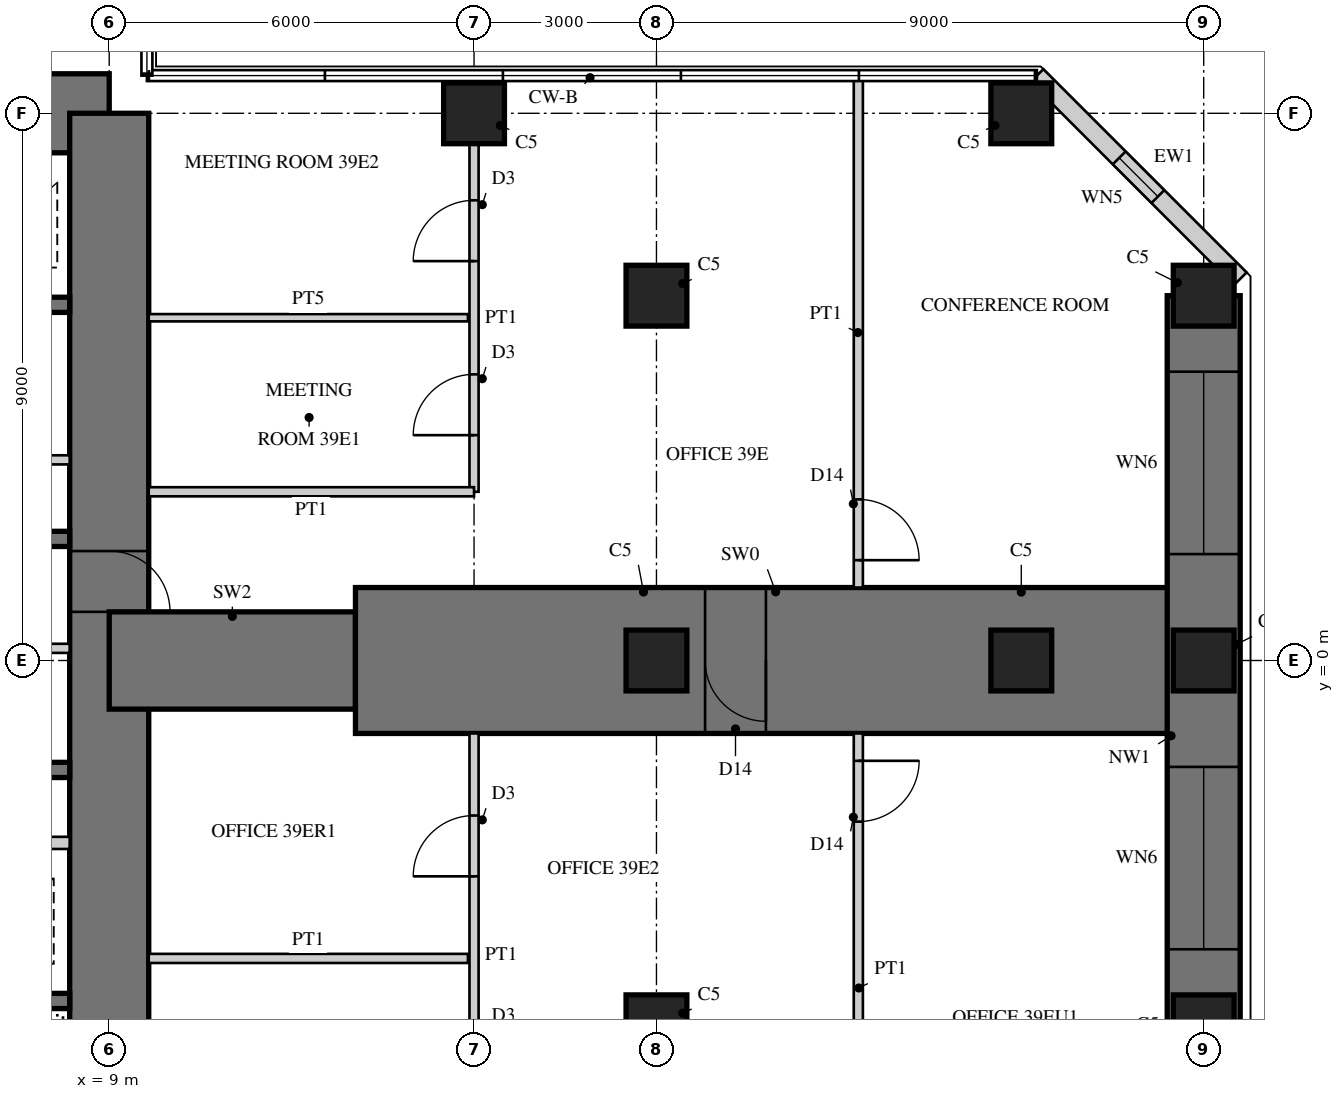
"""IFC4 building model, lengths in metres.
Left out: names, types, materials, properties, quantities, classifications, styles, units other than length and angle.
Written with IfcOpenShell. Run it as: python <this file> out.ifc"""

import sys

from ifc_helpers import new_model, si_unit, direction, frame, frame_2d, origin, origin_2d, place, context, subcontext, project, spatial, rectangle, hollow_rectangle, extrude, element, fill, save


model = new_model("IFC4")
c1 = context("Model", 3, precision=1e-05, world=origin(), true_north=direction((0.0, 1.0)))
c2 = subcontext(c1, "Body", "Model", "MODEL_VIEW")
j1 = project(units=[si_unit("LENGTHUNIT", "METRE"), si_unit("PLANEANGLEUNIT", "RADIAN")], contexts=[c1])
p1 = place(None, origin())
s1 = spatial("IfcSite", under=j1, at=p1, CompositionType="ELEMENT")
p2 = place(p1, origin())
s2 = spatial("IfcBuilding", under=s1, at=p2, CompositionType="ELEMENT")
p3 = place(p2, frame((0.0, 0.0, 160.5)))
s3 = spatial("IfcBuildingStorey", under=s2, at=p3, CompositionType="ELEMENT", Elevation=160.5)
p4 = place(p3, frame((9.0, 9.0, 0.0), z_axis=(0.0, 0.0, 1.0), x_axis=(-1.0, 0.0, 0.0)))
e1 = element("IfcWall", 1, at=p4, inside=s3, PredefinedType="SHEAR", context=c2, shape_type="SweptSolid", body=[
    extrude(rectangle(XDim=18.0, YDim=1.3, at=frame_2d((9.0, 0.0))), origin(), (0.0, 0.0, 1.0), 4.0),
])
p5 = place(p4, frame((9.8, 0.0, 0.0)))
e2 = element("IfcOpeningElement", 2, at=p5, cuts=e1, PredefinedType="OPENING", context=c2, shape_type="SweptSolid", body=[
    extrude(rectangle(XDim=1.0, YDim=2.4, at=frame_2d((0.5, 1.2))), frame((0.0, 0.66, 0.0), z_axis=(0.0, -1.0, 0.0), x_axis=(1.0, 0.0, 0.0)), (0.0, 0.0, 1.0), 1.32),
])
p6 = place(p3, frame((9.0, -9.0, 0.0), z_axis=(0.0, 0.0, 1.0), x_axis=(0.0, 1.0, 0.0)))
e3 = element("IfcWall", 3, at=p6, inside=s3, PredefinedType="SHEAR", context=c2, shape_type="SweptSolid", body=[
    extrude(rectangle(XDim=18.0, YDim=1.3, at=frame_2d((9.0, 0.0))), origin(), (0.0, 0.0, 1.0), 4.0),
])
p7 = place(p6, frame((9.8, 0.0, 0.0)))
e4 = element("IfcOpeningElement", 4, at=p7, cuts=e3, PredefinedType="OPENING", context=c2, shape_type="SweptSolid", body=[
    extrude(rectangle(XDim=1.0, YDim=2.4, at=frame_2d((0.5, 1.2))), frame((0.0, 0.66, 0.0), z_axis=(0.0, -1.0, 0.0), x_axis=(1.0, 0.0, 0.0)), (0.0, 0.0, 1.0), 1.32),
])
p8 = place(p3, frame((1.925, 2.0, 0.0), z_axis=(0.0, 0.0, 1.0), x_axis=(1.0, 0.0, 0.0)))
e5 = element("IfcWall", 5, at=p8, inside=s3, PredefinedType="SHEAR", context=c2, shape_type="SweptSolid", body=[
    extrude(rectangle(XDim=6.425, YDim=0.25, at=frame_2d((3.212, 0.0))), origin(), (0.0, 0.0, 1.0), 4.0),
])
p9 = place(p3, frame((1.925, 5.85, 0.0), z_axis=(0.0, 0.0, 1.0), x_axis=(1.0, 0.0, 0.0)))
e6 = element("IfcWall", 6, at=p9, inside=s3, PredefinedType="SHEAR", context=c2, shape_type="SweptSolid", body=[
    extrude(rectangle(XDim=6.425, YDim=0.25, at=frame_2d((3.212, 0.0))), origin(), (0.0, 0.0, 1.0), 4.0),
])
p10 = place(p9, frame((0.454, 0.0, 0.0)))
e7 = element("IfcOpeningElement", 7, at=p10, cuts=e6, PredefinedType="OPENING", context=c2, shape_type="SweptSolid", body=[
    extrude(rectangle(XDim=1.1, YDim=2.2, at=frame_2d((0.55, 1.1))), frame((0.0, 0.135, 0.0), z_axis=(0.0, -1.0, 0.0), x_axis=(1.0, 0.0, 0.0)), (0.0, 0.0, 1.0), 0.27),
])
p11 = place(p9, frame((2.663, 0.0, 0.0)))
e8 = element("IfcOpeningElement", 8, at=p11, cuts=e6, PredefinedType="OPENING", context=c2, shape_type="SweptSolid", body=[
    extrude(rectangle(XDim=1.1, YDim=2.2, at=frame_2d((0.55, 1.1))), frame((0.0, 0.135, 0.0), z_axis=(0.0, -1.0, 0.0), x_axis=(1.0, 0.0, 0.0)), (0.0, 0.0, 1.0), 0.27),
])
p12 = place(p9, frame((4.871, 0.0, 0.0)))
e9 = element("IfcOpeningElement", 9, at=p12, cuts=e6, PredefinedType="OPENING", context=c2, shape_type="SweptSolid", body=[
    extrude(rectangle(XDim=1.1, YDim=2.2, at=frame_2d((0.55, 1.1))), frame((0.0, 0.135, 0.0), z_axis=(0.0, -1.0, 0.0), x_axis=(1.0, 0.0, 0.0)), (0.0, 0.0, 1.0), 0.27),
])
p13 = place(p3, frame((1.925, 3.3, 0.0), z_axis=(0.0, 0.0, 1.0), x_axis=(1.0, 0.0, 0.0)))
e10 = element("IfcWall", 10, at=p13, inside=s3, PredefinedType="PARTITIONING", context=c2, shape_type="SweptSolid", body=[
    extrude(rectangle(XDim=6.425, YDim=0.15, at=frame_2d((3.212, 0.0))), origin(), (0.0, 0.0, 1.0), 4.0),
])
p14 = place(p13, frame((0.075, 0.0, 0.0)))
e11 = element("IfcOpeningElement", 11, at=p14, cuts=e10, PredefinedType="OPENING", context=c2, shape_type="SweptSolid", body=[
    extrude(rectangle(XDim=0.8, YDim=2.1, at=frame_2d((0.4, 1.05))), frame((0.0, 0.085, 0.0), z_axis=(0.0, -1.0, 0.0), x_axis=(1.0, 0.0, 0.0)), (0.0, 0.0, 1.0), 0.17),
])
p15 = place(p13, frame((3.675, 0.0, 0.0)))
e12 = element("IfcOpeningElement", 12, at=p15, cuts=e10, PredefinedType="OPENING", context=c2, shape_type="SweptSolid", body=[
    extrude(rectangle(XDim=0.8, YDim=2.1, at=frame_2d((0.4, 1.05))), frame((0.0, 0.085, 0.0), z_axis=(0.0, -1.0, 0.0), x_axis=(1.0, 0.0, 0.0)), (0.0, 0.0, 1.0), 0.17),
])
p16 = place(p3, frame((2.125, -1.8, 0.0), z_axis=(0.0, 0.0, 1.0), x_axis=(1.0, 0.0, 0.0)))
e13 = element("IfcWall", 13, at=p16, inside=s3, PredefinedType="SHEAR", context=c2, shape_type="SweptSolid", body=[
    extrude(rectangle(XDim=6.225, YDim=0.25, at=frame_2d((3.113, 0.0))), origin(), (0.0, 0.0, 1.0), 4.0),
])
p17 = place(p3, frame((2.125, -5.6, 0.0), z_axis=(0.0, 0.0, 1.0), x_axis=(1.0, 0.0, 0.0)))
e14 = element("IfcWall", 14, at=p17, inside=s3, PredefinedType="SHEAR", context=c2, shape_type="SweptSolid", body=[
    extrude(rectangle(XDim=6.225, YDim=0.25, at=frame_2d((3.113, 0.0))), origin(), (0.0, 0.0, 1.0), 4.0),
])
p18 = place(p17, frame((0.175, 0.0, 0.0)))
e15 = element("IfcOpeningElement", 15, at=p18, cuts=e14, PredefinedType="OPENING", context=c2, shape_type="SweptSolid", body=[
    extrude(rectangle(XDim=1.0, YDim=2.1, at=frame_2d((0.5, 1.05))), frame((0.0, 0.135, 0.0), z_axis=(0.0, -1.0, 0.0), x_axis=(1.0, 0.0, 0.0)), (0.0, 0.0, 1.0), 0.27),
])
p19 = place(p3, frame((5.725, -3.0, 0.0), z_axis=(0.0, 0.0, 1.0), x_axis=(1.0, 0.0, 0.0)))
e16 = element("IfcWall", 16, at=p19, inside=s3, PredefinedType="PARTITIONING", context=c2, shape_type="SweptSolid", body=[
    extrude(rectangle(XDim=2.625, YDim=0.2, at=frame_2d((1.312, 0.0))), origin(), (0.0, 0.0, 1.0), 4.0),
])
p20 = place(p3, frame((9.0, 0.0, 0.0), z_axis=(0.0, 0.0, 1.0), x_axis=(1.0, 0.0, 0.0)))
e17 = element("IfcWall", 17, at=p20, inside=s3, PredefinedType="SHEAR", context=c2, shape_type="SweptSolid", body=[
    extrude(rectangle(XDim=4.05, YDim=1.6, at=frame_2d((2.025, 0.0))), origin(), (0.0, 0.0, 1.0), 4.0),
])
p21 = place(p3, frame((13.05, 0.0, 0.0), z_axis=(0.0, 0.0, 1.0), x_axis=(1.0, 0.0, 0.0)))
e18 = element("IfcWall", 18, at=p21, inside=s3, PredefinedType="SHEAR", context=c2, shape_type="SweptSolid", body=[
    extrude(rectangle(XDim=13.95, YDim=2.4, at=frame_2d((6.975, 0.0))), origin(), (0.0, 0.0, 1.0), 4.0),
])
p22 = place(p21, frame((5.75, 0.0, 0.0)))
e19 = element("IfcOpeningElement", 19, at=p22, cuts=e18, PredefinedType="OPENING", context=c2, shape_type="SweptSolid", body=[
    extrude(rectangle(XDim=1.0, YDim=2.2, at=frame_2d((0.5, 1.1))), frame((0.0, 1.21, 0.0), z_axis=(0.0, -1.0, 0.0), x_axis=(1.0, 0.0, 0.0)), (0.0, 0.0, 1.0), 2.42),
])
p23 = place(p3, frame((27.0, -6.0, 0.0), z_axis=(0.0, 0.0, 1.0), x_axis=(0.0, 1.0, 0.0)))
e20 = element("IfcWall", 20, at=p23, inside=s3, PredefinedType="SHEAR", context=c2, shape_type="SweptSolid", body=[
    extrude(rectangle(XDim=12.0, YDim=1.2, at=frame_2d((6.0, 0.0))), origin(), (0.0, 0.0, 1.0), 4.0),
])
p24 = place(p23, frame((1.25, 0.0, 0.6)))
e21 = element("IfcOpeningElement", 21, at=p24, cuts=e20, PredefinedType="OPENING", context=c2, shape_type="SweptSolid", body=[
    extrude(rectangle(XDim=3.0, YDim=2.4, at=frame_2d((1.5, 1.2))), frame((0.0, 0.61, 0.0), z_axis=(0.0, -1.0, 0.0), x_axis=(1.0, 0.0, 0.0)), (0.0, 0.0, 1.0), 1.22),
])
p25 = place(p23, frame((7.75, 0.0, 0.6)))
e22 = element("IfcOpeningElement", 22, at=p25, cuts=e20, PredefinedType="OPENING", context=c2, shape_type="SweptSolid", body=[
    extrude(rectangle(XDim=3.0, YDim=2.4, at=frame_2d((1.5, 1.2))), frame((0.0, 0.61, 0.0), z_axis=(0.0, -1.0, 0.0), x_axis=(1.0, 0.0, 0.0)), (0.0, 0.0, 1.0), 1.22),
])
for number, where, z_axis, x_axis in (
    (23, (15.0, 9.0, 0.0), (0.0, 0.0, 1.0), (1.0, 0.0, 0.0)),
    (24, (24.0, 9.0, 0.0), (0.0, 0.0, 1.0), (1.0, 0.0, 0.0)),
    (25, (27.0, -6.0, 0.0), (0.0, 0.0, 1.0), (1.0, 0.0, 0.0)),
    (26, (27.0, 0.0, 0.0), (0.0, 0.0, 1.0), (1.0, 0.0, 0.0)),
    (27, (27.0, 6.0, 0.0), (0.0, 0.0, 1.0), (1.0, 0.0, 0.0)),
    (28, (18.0, -6.0, 0.0), (0.0, 0.0, 1.0), (1.0, 0.0, 0.0)),
    (29, (18.0, 0.0, 0.0), (0.0, 0.0, 1.0), (1.0, 0.0, 0.0)),
    (30, (18.0, 6.0, 0.0), (0.0, 0.0, 1.0), (1.0, 0.0, 0.0)),
    (31, (24.0, 0.0, 0.0), (0.0, 0.0, 1.0), (1.0, 0.0, 0.0)),
):
    element("IfcColumn", number, at=place(p3, frame(where, z_axis=z_axis, x_axis=x_axis)), inside=s3, PredefinedType="COLUMN", context=c2, shape_type="SweptSolid", body=[
        extrude(rectangle(XDim=1.0, YDim=1.0, at=origin_2d()), origin(), (0.0, 0.0, 1.0), 4.0),
    ])
p26 = place(p3, frame((27.6, 6.277, 0.0), z_axis=(0.0, 0.0, 1.0), x_axis=(-0.707106781187, 0.707106781187, 0.0)))
e32 = element("IfcWall", 32, at=p26, inside=s3, PredefinedType="SOLIDWALL", context=c2, shape_type="SweptSolid", body=[
    extrude(rectangle(XDim=4.728, YDim=0.3, at=frame_2d((2.364, 0.0))), origin(), (0.0, 0.0, 1.0), 3.75),
])
p27 = place(p26, frame((1.914, 0.0, 0.3)))
e33 = element("IfcOpeningElement", 33, at=p27, cuts=e32, PredefinedType="OPENING", context=c2, shape_type="SweptSolid", body=[
    extrude(rectangle(XDim=0.9, YDim=2.4, at=frame_2d((0.45, 1.2))), frame((0.0, 0.16, 0.0), z_axis=(0.0, -1.0, 0.0), x_axis=(1.0, 0.0, 0.0)), (0.0, 0.0, 1.0), 0.32),
])
p28 = place(p3, frame((2.325, 0.2, 0.0), z_axis=(0.0, 0.0, 1.0), x_axis=(1.0, 0.0, 0.0)))
e34 = element("IfcWall", 34, at=p28, inside=s3, PredefinedType="PARTITIONING", context=c2, shape_type="SweptSolid", body=[
    extrude(rectangle(XDim=6.025, YDim=0.15, at=frame_2d((3.013, 0.0))), origin(), (0.0, 0.0, 1.0), 3.75),
])
p29 = place(p28, frame((0.4, 0.0, 0.0)))
e35 = element("IfcOpeningElement", 35, at=p29, cuts=e34, PredefinedType="OPENING", context=c2, shape_type="SweptSolid", body=[
    extrude(rectangle(XDim=1.0, YDim=2.1, at=frame_2d((0.5, 1.05))), frame((0.0, 0.085, 0.0), z_axis=(0.0, -1.0, 0.0), x_axis=(1.0, 0.0, 0.0)), (0.0, 0.0, 1.0), 0.17),
])
p30 = place(p3, frame((15.0, 2.775, 0.0), z_axis=(0.0, 0.0, 1.0), x_axis=(0.0, 1.0, 0.0)))
e36 = element("IfcWall", 36, at=p30, inside=s3, PredefinedType="PARTITIONING", context=c2, shape_type="SweptSolid", body=[
    extrude(rectangle(XDim=5.725, YDim=0.15, at=frame_2d((2.863, 0.0))), origin(), (0.0, 0.0, 1.0), 2.7),
])
p31 = place(p30, frame((0.931, 0.0, 0.0)))
e37 = element("IfcOpeningElement", 37, at=p31, cuts=e36, PredefinedType="OPENING", context=c2, shape_type="SweptSolid", body=[
    extrude(rectangle(XDim=1.0, YDim=2.1, at=frame_2d((0.5, 1.05))), frame((0.0, 0.085, 0.0), z_axis=(0.0, -1.0, 0.0), x_axis=(1.0, 0.0, 0.0)), (0.0, 0.0, 1.0), 0.17),
])
p32 = place(p30, frame((3.794, 0.0, 0.0)))
e38 = element("IfcOpeningElement", 38, at=p32, cuts=e36, PredefinedType="OPENING", context=c2, shape_type="SweptSolid", body=[
    extrude(rectangle(XDim=1.0, YDim=2.1, at=frame_2d((0.5, 1.05))), frame((0.0, 0.085, 0.0), z_axis=(0.0, -1.0, 0.0), x_axis=(1.0, 0.0, 0.0)), (0.0, 0.0, 1.0), 0.17),
])
p33 = place(p3, frame((9.65, 2.775, 0.0), z_axis=(0.0, 0.0, 1.0), x_axis=(1.0, 0.0, 0.0)))
e39 = element("IfcWall", 39, at=p33, inside=s3, PredefinedType="PARTITIONING", context=c2, shape_type="SweptSolid", body=[
    extrude(rectangle(XDim=5.35, YDim=0.15, at=frame_2d((2.675, 0.0))), origin(), (0.0, 0.0, 1.0), 3.75),
])
p34 = place(p3, frame((9.65, 5.637, 0.0), z_axis=(0.0, 0.0, 1.0), x_axis=(1.0, 0.0, 0.0)))
e40 = element("IfcWall", 40, at=p34, inside=s3, PredefinedType="PLUMBINGWALL", context=c2, shape_type="SweptSolid", body=[
    extrude(rectangle(XDim=5.25, YDim=0.12, at=frame_2d((2.625, 0.0))), origin(), (0.0, 0.0, 1.0), 3.75),
])
p35 = place(p3, frame((15.0, -8.5, 0.0), z_axis=(0.0, 0.0, 1.0), x_axis=(0.0, 1.0, 0.0)))
e41 = element("IfcWall", 41, at=p35, inside=s3, PredefinedType="PARTITIONING", context=c2, shape_type="SweptSolid", body=[
    extrude(rectangle(XDim=7.3, YDim=0.15, at=frame_2d((3.65, 0.0))), origin(), (0.0, 0.0, 1.0), 2.7),
])
p36 = place(p35, frame((1.3, 0.0, 0.0)))
e42 = element("IfcOpeningElement", 42, at=p36, cuts=e41, PredefinedType="OPENING", context=c2, shape_type="SweptSolid", body=[
    extrude(rectangle(XDim=1.0, YDim=2.1, at=frame_2d((0.5, 1.05))), frame((0.0, 0.085, 0.0), z_axis=(0.0, -1.0, 0.0), x_axis=(1.0, 0.0, 0.0)), (0.0, 0.0, 1.0), 0.17),
])
p37 = place(p35, frame((4.95, 0.0, 0.0)))
e43 = element("IfcOpeningElement", 43, at=p37, cuts=e41, PredefinedType="OPENING", context=c2, shape_type="SweptSolid", body=[
    extrude(rectangle(XDim=1.0, YDim=2.1, at=frame_2d((0.5, 1.05))), frame((0.0, 0.085, 0.0), z_axis=(0.0, -1.0, 0.0), x_axis=(1.0, 0.0, 0.0)), (0.0, 0.0, 1.0), 0.17),
])
p38 = place(p3, frame((9.65, -4.9, 0.0), z_axis=(0.0, 0.0, 1.0), x_axis=(1.0, 0.0, 0.0)))
e44 = element("IfcWall", 44, at=p38, inside=s3, PredefinedType="PARTITIONING", context=c2, shape_type="SweptSolid", body=[
    extrude(rectangle(XDim=5.25, YDim=0.15, at=frame_2d((2.625, 0.0))), origin(), (0.0, 0.0, 1.0), 3.75),
])
p39 = place(p3, frame((21.32, 1.2, 0.0), z_axis=(0.0, 0.0, 1.0), x_axis=(0.0, 1.0, 0.0)))
e45 = element("IfcWall", 45, at=p39, inside=s3, PredefinedType="PARTITIONING", context=c2, shape_type="SweptSolid", body=[
    extrude(rectangle(XDim=8.38, YDim=0.15, at=frame_2d((4.19, 0.0))), origin(), (0.0, 0.0, 1.0), 3.75),
])
p40 = place(p39, frame((0.45, 0.0, 0.0)))
e46 = element("IfcOpeningElement", 46, at=p40, cuts=e45, PredefinedType="OPENING", context=c2, shape_type="SweptSolid", body=[
    extrude(rectangle(XDim=1.0, YDim=2.2, at=frame_2d((0.5, 1.1))), frame((0.0, 0.085, 0.0), z_axis=(0.0, -1.0, 0.0), x_axis=(1.0, 0.0, 0.0)), (0.0, 0.0, 1.0), 0.17),
])
p41 = place(p3, frame((21.32, -9.58, 0.0), z_axis=(0.0, 0.0, 1.0), x_axis=(0.0, 1.0, 0.0)))
e47 = element("IfcWall", 47, at=p41, inside=s3, PredefinedType="PARTITIONING", context=c2, shape_type="SweptSolid", body=[
    extrude(rectangle(XDim=8.38, YDim=0.15, at=frame_2d((4.19, 0.0))), origin(), (0.0, 0.0, 1.0), 3.75),
])
p42 = place(p41, frame((6.93, 0.0, 0.0)))
e48 = element("IfcOpeningElement", 48, at=p42, cuts=e47, PredefinedType="OPENING", context=c2, shape_type="SweptSolid", body=[
    extrude(rectangle(XDim=1.0, YDim=2.2, at=frame_2d((0.5, 1.1))), frame((0.0, 0.085, 0.0), z_axis=(0.0, -1.0, 0.0), x_axis=(1.0, 0.0, 0.0)), (0.0, 0.0, 1.0), 0.17),
])
p43 = place(p24, origin())
e49 = element("IfcWindow", 49, at=p43, inside=s3, PartitioningType="SINGLE_PANEL", PredefinedType="WINDOW", context=c2, shape_type="SweptSolid", body=[
    extrude(hollow_rectangle(XDim=3.0, YDim=2.4, WallThickness=0.06, at=frame_2d((1.5, 1.2))), frame((0.0, 0.03, 0.0), z_axis=(0.0, -1.0, 0.0), x_axis=(1.0, 0.0, 0.0)), (0.0, 0.0, 1.0), 0.06),
    extrude(rectangle(XDim=2.879, YDim=2.279, at=frame_2d((1.5, 1.2))), frame((0.0, 0.03, 0.0), z_axis=(0.0, -1.0, 0.0), x_axis=(1.0, 0.0, 0.0)), (0.0, 0.0, 1.0), 0.06),
])
fill(e21, e49)
p44 = place(p25, origin())
e50 = element("IfcWindow", 50, at=p44, inside=s3, PartitioningType="SINGLE_PANEL", PredefinedType="WINDOW", context=c2, shape_type="SweptSolid", body=[
    extrude(hollow_rectangle(XDim=3.0, YDim=2.4, WallThickness=0.06, at=frame_2d((1.5, 1.2))), frame((0.0, 0.03, 0.0), z_axis=(0.0, -1.0, 0.0), x_axis=(1.0, 0.0, 0.0)), (0.0, 0.0, 1.0), 0.06),
    extrude(rectangle(XDim=2.879, YDim=2.279, at=frame_2d((1.5, 1.2))), frame((0.0, 0.03, 0.0), z_axis=(0.0, -1.0, 0.0), x_axis=(1.0, 0.0, 0.0)), (0.0, 0.0, 1.0), 0.06),
])
fill(e22, e50)
p45 = place(p27, origin())
e51 = element("IfcWindow", 51, at=p45, inside=s3, PartitioningType="SINGLE_PANEL", PredefinedType="WINDOW", context=c2, shape_type="SweptSolid", body=[
    extrude(hollow_rectangle(XDim=0.9, YDim=2.4, WallThickness=0.06, at=frame_2d((0.45, 1.2))), frame((0.0, 0.03, 0.0), z_axis=(0.0, -1.0, 0.0), x_axis=(1.0, 0.0, 0.0)), (0.0, 0.0, 1.0), 0.06),
    extrude(rectangle(XDim=0.779, YDim=2.279, at=frame_2d((0.45, 1.2))), frame((0.0, 0.03, 0.0), z_axis=(0.0, -1.0, 0.0), x_axis=(1.0, 0.0, 0.0)), (0.0, 0.0, 1.0), 0.06),
])
fill(e33, e51)
p46 = place(p31, origin())
e52 = element("IfcDoor", 52, at=p46, inside=s3, OperationType="SINGLE_SWING_LEFT", PredefinedType="DOOR", context=c2, shape_type="SweptSolid", body=[
    extrude(rectangle(XDim=1.0, YDim=2.1, at=frame_2d((0.5, 1.05))), frame((0.0, 0.025, 0.0), z_axis=(0.0, -1.0, 0.0), x_axis=(1.0, 0.0, 0.0)), (0.0, 0.0, 1.0), 0.05),
])
fill(e37, e52)
p47 = place(p32, origin())
e53 = element("IfcDoor", 53, at=p47, inside=s3, OperationType="SINGLE_SWING_LEFT", PredefinedType="DOOR", context=c2, shape_type="SweptSolid", body=[
    extrude(rectangle(XDim=1.0, YDim=2.1, at=frame_2d((0.5, 1.05))), frame((0.0, 0.025, 0.0), z_axis=(0.0, -1.0, 0.0), x_axis=(1.0, 0.0, 0.0)), (0.0, 0.0, 1.0), 0.05),
])
fill(e38, e53)
p48 = place(p37, origin())
e54 = element("IfcDoor", 54, at=p48, inside=s3, OperationType="SINGLE_SWING_LEFT", PredefinedType="DOOR", context=c2, shape_type="SweptSolid", body=[
    extrude(rectangle(XDim=1.0, YDim=2.1, at=frame_2d((0.5, 1.05))), frame((0.0, 0.025, 0.0), z_axis=(0.0, -1.0, 0.0), x_axis=(1.0, 0.0, 0.0)), (0.0, 0.0, 1.0), 0.05),
])
fill(e43, e54)
p49 = place(p40, frame((1.0, 0.0, 0.0), z_axis=(0.0, 0.0, 1.0), x_axis=(-1.0, 0.0, 0.0)))
e55 = element("IfcDoor", 55, at=p49, inside=s3, OperationType="SINGLE_SWING_RIGHT", PredefinedType="DOOR", context=c2, shape_type="SweptSolid", body=[
    extrude(rectangle(XDim=1.0, YDim=2.2, at=frame_2d((0.5, 1.1))), frame((0.0, 0.025, 0.0), z_axis=(0.0, -1.0, 0.0), x_axis=(1.0, 0.0, 0.0)), (0.0, 0.0, 1.0), 0.05),
])
fill(e46, e55)
p50 = place(p42, frame((1.0, 0.0, 0.0), z_axis=(0.0, 0.0, 1.0), x_axis=(-1.0, 0.0, 0.0)))
e56 = element("IfcDoor", 56, at=p50, inside=s3, OperationType="SINGLE_SWING_LEFT", PredefinedType="DOOR", context=c2, shape_type="SweptSolid", body=[
    extrude(rectangle(XDim=1.0, YDim=2.2, at=frame_2d((0.5, 1.1))), frame((0.0, 0.025, 0.0), z_axis=(0.0, -1.0, 0.0), x_axis=(1.0, 0.0, 0.0)), (0.0, 0.0, 1.0), 0.05),
])
fill(e48, e56)
p51 = place(p22, frame((1.0, 0.0, 0.0), z_axis=(0.0, 0.0, 1.0), x_axis=(-1.0, 0.0, 0.0)))
e57 = element("IfcDoor", 57, at=p51, inside=s3, OperationType="SINGLE_SWING_LEFT", PredefinedType="DOOR", context=c2, shape_type="SweptSolid", body=[
    extrude(rectangle(XDim=1.0, YDim=2.2, at=frame_2d((0.5, 1.1))), frame((0.0, 0.025, 0.0), z_axis=(0.0, -1.0, 0.0), x_axis=(1.0, 0.0, 0.0)), (0.0, 0.0, 1.0), 0.05),
])
fill(e19, e57)
p52 = place(p7, frame((1.0, 0.0, 0.0), z_axis=(0.0, 0.0, 1.0), x_axis=(-1.0, 0.0, 0.0)))
e58 = element("IfcDoor", 58, at=p52, inside=s3, OperationType="SINGLE_SWING_RIGHT", PredefinedType="DOOR", context=c2, shape_type="SweptSolid", body=[
    extrude(rectangle(XDim=1.0, YDim=2.4, at=frame_2d((0.5, 1.2))), frame((0.0, -0.005, 0.0), z_axis=(0.0, -1.0, 0.0), x_axis=(1.0, 0.0, 0.0)), (0.0, 0.0, 1.0), 0.05),
])
fill(e4, e58)
save(model, sys.argv[1])
